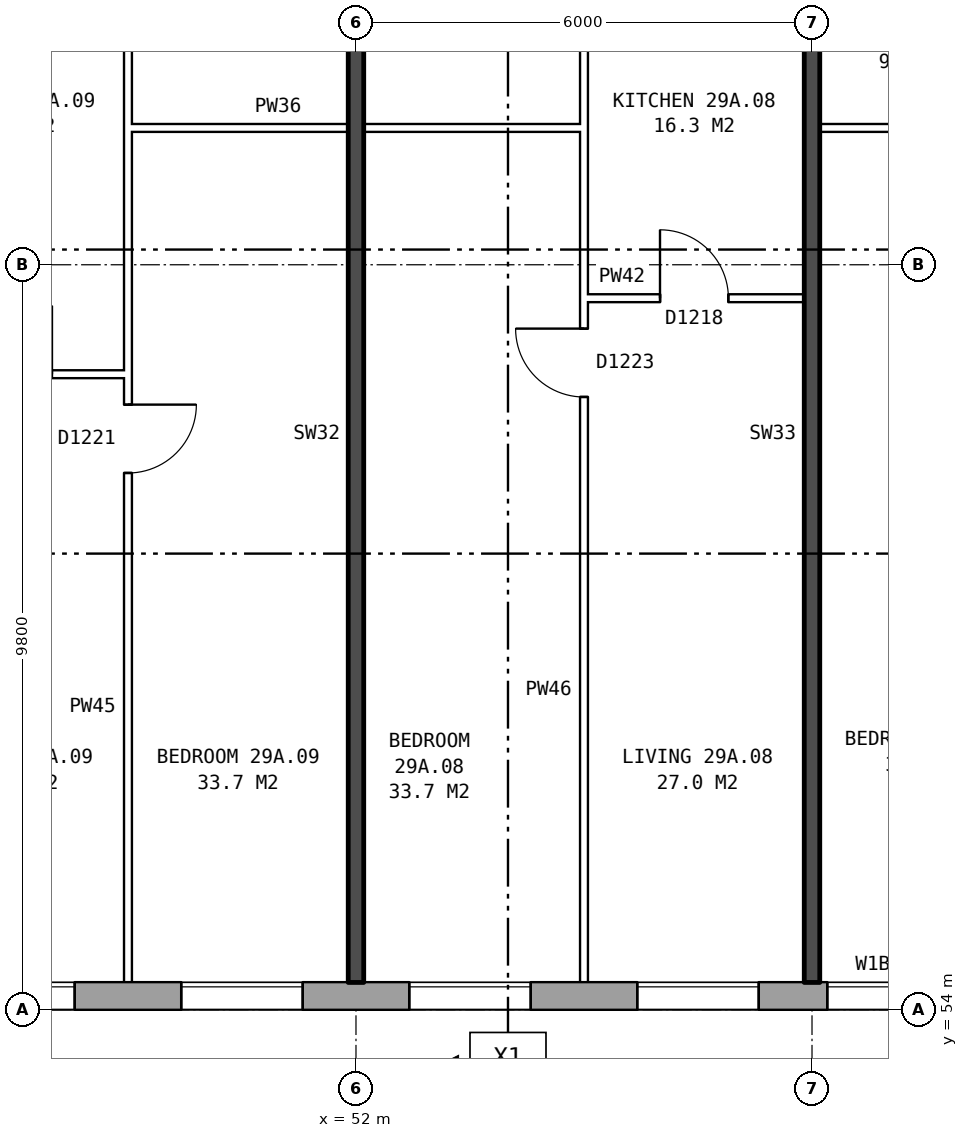
"""IFC4 building model, lengths in metres.
Left out: names, types, materials, properties, quantities, classifications, styles, units other than length and angle.
Written with IfcOpenShell. Run it as: python <this file> out.ifc"""

import sys

from ifc_helpers import new_model, si_unit, direction, frame, frame_2d, origin, place, context, subcontext, project, spatial, rectangle, extrude, element, fill, save


model = new_model("IFC4")
c1 = context("Model", 3, precision=1e-05, world=origin(), true_north=direction((0.0, 1.0)))
c2 = subcontext(c1, "Body", "Model", "MODEL_VIEW")
j1 = project(units=[si_unit("LENGTHUNIT", "METRE"), si_unit("PLANEANGLEUNIT", "RADIAN")], contexts=[c1])
p1 = place(None, origin())
s1 = spatial("IfcSite", under=j1, at=p1, CompositionType="ELEMENT")
p2 = place(p1, origin())
s2 = spatial("IfcBuilding", under=s1, at=p2, CompositionType="ELEMENT")
p3 = place(p2, frame((0.0, 0.0, 105.7)))
s3 = spatial("IfcBuildingStorey", under=s2, at=p3, CompositionType="ELEMENT", Elevation=105.7)
p4 = place(p3, frame((28.075, 54.18, 0.0), z_axis=(0.0, 0.0, 1.0), x_axis=(1.0, 0.0, 0.0)))
e1 = element("IfcWall", 1, at=p4, inside=s3, PredefinedType="STANDARD", context=c2, shape_type="SweptSolid", body=[
    extrude(rectangle(XDim=44.851, YDim=0.36, at=frame_2d((22.425, 0.0))), origin(), (0.0, 0.0, 1.0), 2.85),
])
p5 = place(p4, frame((0.625, 0.0, 0.8)))
e2 = element("IfcOpeningElement", 2, at=p5, cuts=e1, PredefinedType="OPENING", context=c2, shape_type="SweptSolid", body=[
    extrude(rectangle(XDim=1.6, YDim=1.8, at=frame_2d((0.8, 0.9))), frame((0.0, 0.19, 0.0), z_axis=(0.0, -1.0, 0.0), x_axis=(1.0, 0.0, 0.0)), (0.0, 0.0, 1.0), 0.38),
])
p6 = place(p4, frame((3.625, 0.0, 0.8)))
e3 = element("IfcOpeningElement", 3, at=p6, cuts=e1, PredefinedType="OPENING", context=c2, shape_type="SweptSolid", body=[
    extrude(rectangle(XDim=1.6, YDim=1.8, at=frame_2d((0.8, 0.9))), frame((0.0, 0.19, 0.0), z_axis=(0.0, -1.0, 0.0), x_axis=(1.0, 0.0, 0.0)), (0.0, 0.0, 1.0), 0.38),
])
p7 = place(p4, frame((6.625, 0.0, 0.8)))
e4 = element("IfcOpeningElement", 4, at=p7, cuts=e1, PredefinedType="OPENING", context=c2, shape_type="SweptSolid", body=[
    extrude(rectangle(XDim=1.6, YDim=1.8, at=frame_2d((0.8, 0.9))), frame((0.0, 0.19, 0.0), z_axis=(0.0, -1.0, 0.0), x_axis=(1.0, 0.0, 0.0)), (0.0, 0.0, 1.0), 0.38),
])
p8 = place(p4, frame((8.525, 0.0, 0.8)))
e5 = element("IfcOpeningElement", 5, at=p8, cuts=e1, PredefinedType="OPENING", context=c2, shape_type="SweptSolid", body=[
    extrude(rectangle(XDim=1.4, YDim=1.8, at=frame_2d((0.7, 0.9))), frame((0.0, 0.19, 0.0), z_axis=(0.0, -1.0, 0.0), x_axis=(1.0, 0.0, 0.0)), (0.0, 0.0, 1.0), 0.38),
])
p9 = place(p4, frame((13.175, 0.0, 0.8)))
e6 = element("IfcOpeningElement", 6, at=p9, cuts=e1, PredefinedType="OPENING", context=c2, shape_type="SweptSolid", body=[
    extrude(rectangle(XDim=1.0, YDim=0.9, at=frame_2d((0.5, 0.45))), frame((0.0, 0.19, 0.0), z_axis=(0.0, -1.0, 0.0), x_axis=(1.0, 0.0, 0.0)), (0.0, 0.0, 1.0), 0.38),
])
p10 = place(p4, frame((15.625, 0.0, 0.8)))
e7 = element("IfcOpeningElement", 7, at=p10, cuts=e1, PredefinedType="OPENING", context=c2, shape_type="SweptSolid", body=[
    extrude(rectangle(XDim=1.6, YDim=1.8, at=frame_2d((0.8, 0.9))), frame((0.0, 0.19, 0.0), z_axis=(0.0, -1.0, 0.0), x_axis=(1.0, 0.0, 0.0)), (0.0, 0.0, 1.0), 0.38),
])
p11 = place(p4, frame((18.625, 0.0, 0.8)))
e8 = element("IfcOpeningElement", 8, at=p11, cuts=e1, PredefinedType="OPENING", context=c2, shape_type="SweptSolid", body=[
    extrude(rectangle(XDim=1.6, YDim=1.8, at=frame_2d((0.8, 0.9))), frame((0.0, 0.19, 0.0), z_axis=(0.0, -1.0, 0.0), x_axis=(1.0, 0.0, 0.0)), (0.0, 0.0, 1.0), 0.38),
])
p12 = place(p4, frame((21.625, 0.0, 0.8)))
e9 = element("IfcOpeningElement", 9, at=p12, cuts=e1, PredefinedType="OPENING", context=c2, shape_type="SweptSolid", body=[
    extrude(rectangle(XDim=1.6, YDim=1.8, at=frame_2d((0.8, 0.9))), frame((0.0, 0.19, 0.0), z_axis=(0.0, -1.0, 0.0), x_axis=(1.0, 0.0, 0.0)), (0.0, 0.0, 1.0), 0.38),
])
p13 = place(p4, frame((24.625, 0.0, 0.8)))
e10 = element("IfcOpeningElement", 10, at=p13, cuts=e1, PredefinedType="OPENING", context=c2, shape_type="SweptSolid", body=[
    extrude(rectangle(XDim=1.6, YDim=1.8, at=frame_2d((0.8, 0.9))), frame((0.0, 0.19, 0.0), z_axis=(0.0, -1.0, 0.0), x_axis=(1.0, 0.0, 0.0)), (0.0, 0.0, 1.0), 0.38),
])
p14 = place(p4, frame((27.625, 0.0, 0.8)))
e11 = element("IfcOpeningElement", 11, at=p14, cuts=e1, PredefinedType="OPENING", context=c2, shape_type="SweptSolid", body=[
    extrude(rectangle(XDim=1.6, YDim=1.8, at=frame_2d((0.8, 0.9))), frame((0.0, 0.19, 0.0), z_axis=(0.0, -1.0, 0.0), x_axis=(1.0, 0.0, 0.0)), (0.0, 0.0, 1.0), 0.38),
])
p15 = place(p4, frame((30.125, 0.0, 0.15)))
e12 = element("IfcOpeningElement", 12, at=p15, cuts=e1, PredefinedType="OPENING", context=c2, shape_type="SweptSolid", body=[
    extrude(rectangle(XDim=1.2, YDim=1.8, at=frame_2d((0.6, 0.9))), frame((0.0, 0.19, 0.0), z_axis=(0.0, -1.0, 0.0), x_axis=(1.0, 0.0, 0.0)), (0.0, 0.0, 1.0), 0.38),
])
p16 = place(p4, frame((33.075, 0.0, 1.6)))
e13 = element("IfcOpeningElement", 13, at=p16, cuts=e1, PredefinedType="OPENING", context=c2, shape_type="SweptSolid", body=[
    extrude(rectangle(XDim=0.6, YDim=0.9, at=frame_2d((0.3, 0.45))), frame((0.0, 0.19, 0.0), z_axis=(0.0, -1.0, 0.0), x_axis=(1.0, 0.0, 0.0)), (0.0, 0.0, 1.0), 0.38),
])
p17 = place(p4, frame((36.625, 0.0, 0.8)))
e14 = element("IfcOpeningElement", 14, at=p17, cuts=e1, PredefinedType="OPENING", context=c2, shape_type="SweptSolid", body=[
    extrude(rectangle(XDim=1.6, YDim=1.8, at=frame_2d((0.8, 0.9))), frame((0.0, 0.19, 0.0), z_axis=(0.0, -1.0, 0.0), x_axis=(1.0, 0.0, 0.0)), (0.0, 0.0, 1.0), 0.38),
])
p18 = place(p4, frame((39.625, 0.0, 0.8)))
e15 = element("IfcOpeningElement", 15, at=p18, cuts=e1, PredefinedType="OPENING", context=c2, shape_type="SweptSolid", body=[
    extrude(rectangle(XDim=1.6, YDim=1.8, at=frame_2d((0.8, 0.9))), frame((0.0, 0.19, 0.0), z_axis=(0.0, -1.0, 0.0), x_axis=(1.0, 0.0, 0.0)), (0.0, 0.0, 1.0), 0.38),
])
p19 = place(p4, frame((42.625, 0.0, 0.8)))
e16 = element("IfcOpeningElement", 16, at=p19, cuts=e1, PredefinedType="OPENING", context=c2, shape_type="SweptSolid", body=[
    extrude(rectangle(XDim=1.6, YDim=1.8, at=frame_2d((0.8, 0.9))), frame((0.0, 0.19, 0.0), z_axis=(0.0, -1.0, 0.0), x_axis=(1.0, 0.0, 0.0)), (0.0, 0.0, 1.0), 0.38),
])
p20 = place(p4, frame((10.225, 0.0, 1.1)))
e17 = element("IfcOpeningElement", 17, at=p20, cuts=e1, PredefinedType="OPENING", context=c2, shape_type="SweptSolid", body=[
    extrude(rectangle(XDim=0.8, YDim=1.5, at=frame_2d((0.4, 0.75))), frame((0.0, 0.19, 0.0), z_axis=(0.0, -1.0, 0.0), x_axis=(1.0, 0.0, 0.0)), (0.0, 0.0, 1.0), 0.38),
])
p21 = place(p4, frame((14.475, 0.0, 0.8)))
e18 = element("IfcOpeningElement", 18, at=p21, cuts=e1, PredefinedType="OPENING", context=c2, shape_type="SweptSolid", body=[
    extrude(rectangle(XDim=0.8, YDim=1.8, at=frame_2d((0.4, 0.9))), frame((0.0, 0.19, 0.0), z_axis=(0.0, -1.0, 0.0), x_axis=(1.0, 0.0, 0.0)), (0.0, 0.0, 1.0), 0.38),
])
p22 = place(p4, frame((31.625, 0.0, 0.25)))
e19 = element("IfcOpeningElement", 19, at=p22, cuts=e1, PredefinedType="OPENING", context=c2, shape_type="SweptSolid", body=[
    extrude(rectangle(XDim=0.8, YDim=0.9, at=frame_2d((0.4, 0.45))), frame((0.0, 0.19, 0.0), z_axis=(0.0, -1.0, 0.0), x_axis=(1.0, 0.0, 0.0)), (0.0, 0.0, 1.0), 0.38),
])
p23 = place(p4, frame((34.125, 0.0, 0.8)))
e20 = element("IfcOpeningElement", 20, at=p23, cuts=e1, PredefinedType="OPENING", context=c2, shape_type="SweptSolid", body=[
    extrude(rectangle(XDim=1.6, YDim=1.8, at=frame_2d((0.8, 0.9))), frame((0.0, 0.19, 0.0), z_axis=(0.0, -1.0, 0.0), x_axis=(1.0, 0.0, 0.0)), (0.0, 0.0, 1.0), 0.38),
])
p24 = place(p3, frame((46.1, 62.36, 0.0), z_axis=(0.0, 0.0, 1.0), x_axis=(1.0, 0.0, 0.0)))
e21 = element("IfcWall", 21, at=p24, inside=s3, PredefinedType="PARTITIONING", context=c2, shape_type="SweptSolid", body=[
    extrude(rectangle(XDim=2.9, YDim=0.1, at=frame_2d((1.45, 0.0))), origin(), (0.0, 0.0, 1.0), 2.85),
])
p25 = place(p24, frame((1.0, 0.0, 0.0)))
e22 = element("IfcOpeningElement", 22, at=p25, cuts=e21, PredefinedType="OPENING", context=c2, shape_type="SweptSolid", body=[
    extrude(rectangle(XDim=0.9, YDim=2.1, at=frame_2d((0.45, 1.05))), frame((0.0, 0.06, 0.0), z_axis=(0.0, -1.0, 0.0), x_axis=(1.0, 0.0, 0.0)), (0.0, 0.0, 1.0), 0.12),
])
p26 = place(p3, frame((55.0, 63.36, 0.0), z_axis=(0.0, 0.0, 1.0), x_axis=(1.0, 0.0, 0.0)))
e23 = element("IfcWall", 23, at=p26, inside=s3, PredefinedType="PARTITIONING", context=c2, shape_type="SweptSolid", body=[
    extrude(rectangle(XDim=2.9, YDim=0.1, at=frame_2d((1.45, 0.0))), origin(), (0.0, 0.0, 1.0), 2.85),
])
p27 = place(p26, frame((1.0, 0.0, 0.0)))
e24 = element("IfcOpeningElement", 24, at=p27, cuts=e23, PredefinedType="OPENING", context=c2, shape_type="SweptSolid", body=[
    extrude(rectangle(XDim=0.9, YDim=2.1, at=frame_2d((0.45, 1.05))), frame((0.0, 0.06, 0.0), z_axis=(0.0, -1.0, 0.0), x_axis=(1.0, 0.0, 0.0)), (0.0, 0.0, 1.0), 0.12),
])
p28 = place(p3, frame((49.0, 65.6, 0.0), z_axis=(0.0, 0.0, 1.0), x_axis=(1.0, 0.0, 0.0)))
e25 = element("IfcWall", 25, at=p28, inside=s3, PredefinedType="PARTITIONING", context=c2, shape_type="SweptSolid", body=[
    extrude(rectangle(XDim=6.0, YDim=0.1, at=frame_2d((3.0, 0.0))), origin(), (0.0, 0.0, 1.0), 2.85),
])
p29 = place(p3, frame((58.1, 65.6, 0.0), z_axis=(0.0, 0.0, 1.0), x_axis=(1.0, 0.0, 0.0)))
e26 = element("IfcWall", 26, at=p29, inside=s3, PredefinedType="PARTITIONING", context=c2, shape_type="SweptSolid", body=[
    extrude(rectangle(XDim=2.9, YDim=0.1, at=frame_2d((1.45, 0.0))), origin(), (0.0, 0.0, 1.0), 2.85),
])
p30 = place(p3, frame((49.0, 54.36, 0.0), z_axis=(0.0, 0.0, 1.0), x_axis=(0.0, 1.0, 0.0)))
e27 = element("IfcWall", 27, at=p30, inside=s3, PredefinedType="PARTITIONING", context=c2, shape_type="SweptSolid", body=[
    extrude(rectangle(XDim=14.34, YDim=0.1, at=frame_2d((7.17, 0.0))), origin(), (0.0, 0.0, 1.0), 2.85),
])
p31 = place(p30, frame((6.7, 0.0, 0.0)))
e28 = element("IfcOpeningElement", 28, at=p31, cuts=e27, PredefinedType="OPENING", context=c2, shape_type="SweptSolid", body=[
    extrude(rectangle(XDim=0.9, YDim=2.1, at=frame_2d((0.45, 1.05))), frame((0.0, 0.06, 0.0), z_axis=(0.0, -1.0, 0.0), x_axis=(1.0, 0.0, 0.0)), (0.0, 0.0, 1.0), 0.12),
])
p32 = place(p30, frame((13.04, 0.0, 0.0)))
e29 = element("IfcOpeningElement", 29, at=p32, cuts=e27, PredefinedType="OPENING", context=c2, shape_type="SweptSolid", body=[
    extrude(rectangle(XDim=0.9, YDim=2.1, at=frame_2d((0.45, 1.05))), frame((0.0, 0.06, 0.0), z_axis=(0.0, -1.0, 0.0), x_axis=(1.0, 0.0, 0.0)), (0.0, 0.0, 1.0), 0.12),
])
p33 = place(p3, frame((52.0, 54.36, 0.0), z_axis=(0.0, 0.0, 1.0), x_axis=(0.0, 1.0, 0.0)))
e30 = element("IfcWall", 30, at=p33, inside=s3, PredefinedType="SOLIDWALL", context=c2, shape_type="SweptSolid", body=[
    extrude(rectangle(XDim=14.44, YDim=0.2, at=frame_2d((7.22, 0.0))), origin(), (0.0, 0.0, 1.0), 2.85),
])
p34 = place(p3, frame((55.0, 54.36, 0.0), z_axis=(0.0, 0.0, 1.0), x_axis=(0.0, 1.0, 0.0)))
e31 = element("IfcWall", 31, at=p34, inside=s3, PredefinedType="PARTITIONING", context=c2, shape_type="SweptSolid", body=[
    extrude(rectangle(XDim=14.34, YDim=0.1, at=frame_2d((7.17, 0.0))), origin(), (0.0, 0.0, 1.0), 2.85),
])
p35 = place(p34, frame((7.7, 0.0, 0.0)))
e32 = element("IfcOpeningElement", 32, at=p35, cuts=e31, PredefinedType="OPENING", context=c2, shape_type="SweptSolid", body=[
    extrude(rectangle(XDim=0.9, YDim=2.1, at=frame_2d((0.45, 1.05))), frame((0.0, 0.06, 0.0), z_axis=(0.0, -1.0, 0.0), x_axis=(1.0, 0.0, 0.0)), (0.0, 0.0, 1.0), 0.12),
])
p36 = place(p34, frame((13.04, 0.0, 0.0)))
e33 = element("IfcOpeningElement", 33, at=p36, cuts=e31, PredefinedType="OPENING", context=c2, shape_type="SweptSolid", body=[
    extrude(rectangle(XDim=0.9, YDim=2.1, at=frame_2d((0.45, 1.05))), frame((0.0, 0.06, 0.0), z_axis=(0.0, -1.0, 0.0), x_axis=(1.0, 0.0, 0.0)), (0.0, 0.0, 1.0), 0.12),
])
p37 = place(p3, frame((58.0, 54.36, 0.0), z_axis=(0.0, 0.0, 1.0), x_axis=(0.0, 1.0, 0.0)))
e34 = element("IfcWall", 34, at=p37, inside=s3, PredefinedType="SOLIDWALL", context=c2, shape_type="SweptSolid", body=[
    extrude(rectangle(XDim=14.44, YDim=0.2, at=frame_2d((7.22, 0.0))), origin(), (0.0, 0.0, 1.0), 2.85),
])
p38 = place(p11, origin())
e35 = element("IfcWindow", 35, at=p38, inside=s3, PartitioningType="SINGLE_PANEL", PredefinedType="WINDOW", context=c2, shape_type="SweptSolid", body=[
    extrude(rectangle(XDim=1.6, YDim=1.8, at=frame_2d((0.8, 0.9))), frame((0.0, 0.15, 0.0), z_axis=(0.0, -1.0, 0.0), x_axis=(1.0, 0.0, 0.0)), (0.0, 0.0, 1.0), 0.06),
])
fill(e8, e35)
p39 = place(p12, origin())
e36 = element("IfcWindow", 36, at=p39, inside=s3, PartitioningType="SINGLE_PANEL", PredefinedType="WINDOW", context=c2, shape_type="SweptSolid", body=[
    extrude(rectangle(XDim=1.6, YDim=1.8, at=frame_2d((0.8, 0.9))), frame((0.0, 0.15, 0.0), z_axis=(0.0, -1.0, 0.0), x_axis=(1.0, 0.0, 0.0)), (0.0, 0.0, 1.0), 0.06),
])
fill(e9, e36)
p40 = place(p13, origin())
e37 = element("IfcWindow", 37, at=p40, inside=s3, PartitioningType="SINGLE_PANEL", PredefinedType="WINDOW", context=c2, shape_type="SweptSolid", body=[
    extrude(rectangle(XDim=1.6, YDim=1.8, at=frame_2d((0.8, 0.9))), frame((0.0, 0.15, 0.0), z_axis=(0.0, -1.0, 0.0), x_axis=(1.0, 0.0, 0.0)), (0.0, 0.0, 1.0), 0.06),
])
fill(e10, e37)
p41 = place(p14, origin())
e38 = element("IfcWindow", 38, at=p41, inside=s3, PartitioningType="SINGLE_PANEL", PredefinedType="WINDOW", context=c2, shape_type="SweptSolid", body=[
    extrude(rectangle(XDim=1.6, YDim=1.8, at=frame_2d((0.8, 0.9))), frame((0.0, 0.15, 0.0), z_axis=(0.0, -1.0, 0.0), x_axis=(1.0, 0.0, 0.0)), (0.0, 0.0, 1.0), 0.06),
])
fill(e11, e38)
p42 = place(p15, origin())
e39 = element("IfcWindow", 39, at=p42, inside=s3, PartitioningType="SINGLE_PANEL", PredefinedType="WINDOW", context=c2, shape_type="SweptSolid", body=[
    extrude(rectangle(XDim=1.2, YDim=1.8, at=frame_2d((0.6, 0.9))), frame((0.0, 0.15, 0.0), z_axis=(0.0, -1.0, 0.0), x_axis=(1.0, 0.0, 0.0)), (0.0, 0.0, 1.0), 0.06),
])
fill(e12, e39)
p43 = place(p35, origin())
e40 = element("IfcDoor", 40, at=p43, inside=s3, OperationType="SINGLE_SWING_RIGHT", PredefinedType="DOOR", context=c2, shape_type="SweptSolid", body=[
    extrude(rectangle(XDim=0.9, YDim=2.1, at=frame_2d((0.45, 1.05))), frame((0.0, 0.025, 0.0), z_axis=(0.0, -1.0, 0.0), x_axis=(1.0, 0.0, 0.0)), (0.0, 0.0, 1.0), 0.05),
])
fill(e32, e40)
p44 = place(p27, origin())
e41 = element("IfcDoor", 41, at=p44, inside=s3, OperationType="SINGLE_SWING_LEFT", PredefinedType="DOOR", context=c2, shape_type="SweptSolid", body=[
    extrude(rectangle(XDim=0.9, YDim=2.1, at=frame_2d((0.45, 1.05))), frame((0.0, 0.025, 0.0), z_axis=(0.0, -1.0, 0.0), x_axis=(1.0, 0.0, 0.0)), (0.0, 0.0, 1.0), 0.05),
])
fill(e24, e41)
p45 = place(p31, frame((0.9, 0.0, 0.0), z_axis=(0.0, 0.0, 1.0), x_axis=(-1.0, 0.0, 0.0)))
e42 = element("IfcDoor", 42, at=p45, inside=s3, OperationType="SINGLE_SWING_LEFT", PredefinedType="DOOR", context=c2, shape_type="SweptSolid", body=[
    extrude(rectangle(XDim=0.9, YDim=2.1, at=frame_2d((0.45, 1.05))), frame((0.0, 0.025, 0.0), z_axis=(0.0, -1.0, 0.0), x_axis=(1.0, 0.0, 0.0)), (0.0, 0.0, 1.0), 0.05),
])
fill(e28, e42)
save(model, sys.argv[1])
